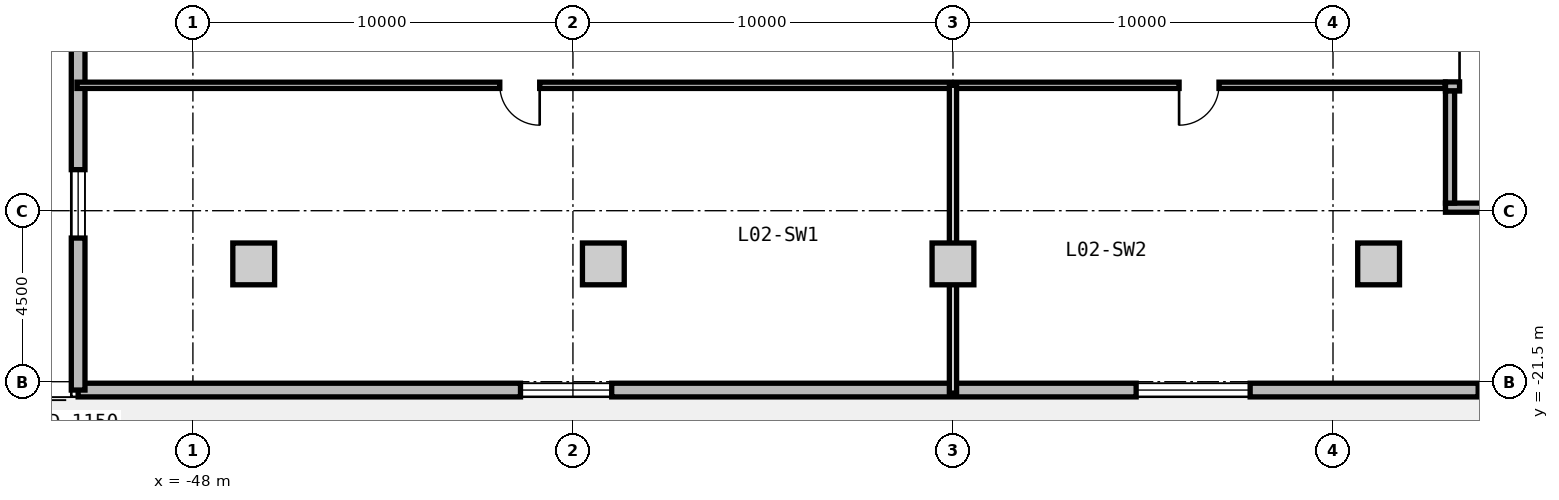
"""IFC4 building model, lengths in metres.
Left out: names, types, materials, properties, quantities, classifications, styles, units other than length and angle.
Written with IfcOpenShell. Run it as: python <this file> out.ifc"""

import sys

from ifc_helpers import new_model, si_unit, direction, frame, frame_2d, origin, origin_2d, place, context, subcontext, project, spatial, rectangle, extrude, source, transform, mapped, element, fill, save


model = new_model("IFC4")
c1 = context("Model", 3, precision=1e-05, world=origin(), true_north=direction((0.0, 1.0)))
c2 = subcontext(c1, "Body", "Model", "MODEL_VIEW")
j1 = project(units=[si_unit("LENGTHUNIT", "METRE"), si_unit("PLANEANGLEUNIT", "RADIAN")], contexts=[c1])
p1 = place(None, origin())
s1 = spatial("IfcSite", under=j1, at=p1, CompositionType="ELEMENT")
p2 = place(p1, origin())
s2 = spatial("IfcBuilding", under=s1, at=p2, CompositionType="ELEMENT")
p3 = place(p2, frame((0.0, 0.0, 8.4)))
s3 = spatial("IfcBuildingStorey", under=s2, at=p3, CompositionType="ELEMENT", Elevation=8.4)
m1 = source(origin(), c2, "Body", "SweptSolid", [
    extrude(rectangle(XDim=1.1, YDim=1.1, at=origin_2d()), origin(), (0.0, 0.0, 1.0), 4.2),
])
for number, where, z_axis, x_axis in (
    (1, (-46.4, -18.4, 0.0), (0.0, 0.0, 1.0), (1.0, 0.0, 0.0)),
    (2, (-37.2, -18.4, 0.0), (0.0, 0.0, 1.0), (1.0, 0.0, 0.0)),
    (3, (-28.0, -18.4, 0.0), (0.0, 0.0, 1.0), (1.0, 0.0, 0.0)),
    (4, (-16.8, -18.4, 0.0), (0.0, 0.0, 1.0), (1.0, 0.0, 0.0)),
):
    element("IfcColumn", number, at=place(p3, frame(where, z_axis=z_axis, x_axis=x_axis)), inside=s3, PredefinedType="COLUMN", context=c2, shape_type="MappedRepresentation", body=[
        mapped(m1, transform((0.0, 0.0, 0.0), x_axis=(1.0, 0.0, 0.0), y_axis=(0.0, 1.0, 0.0), z_axis=(0.0, 0.0, 1.0), scale=1.0)),
    ])
m2 = source(origin(), c2, "Body", "SweptSolid", [
    extrude(rectangle(XDim=102.04, YDim=0.36, at=frame_2d((51.02, 0.0))), origin(), (0.0, 0.0, 1.0), 3.88),
])
p4 = place(p3, frame((51.02, -21.72, 0.0), z_axis=(0.0, 0.0, 1.0), x_axis=(-1.0, 0.0, 0.0)))
e5 = element("IfcWall", 5, at=p4, inside=s3, PredefinedType="SOLIDWALL", context=c2, shape_type="MappedRepresentation", body=[
    mapped(m2, transform((0.0, 0.0, 0.0), x_axis=(1.0, 0.0, 0.0), y_axis=(0.0, 1.0, 0.0), z_axis=(0.0, 0.0, 1.0), scale=1.0)),
])
p5 = place(p4, frame((53.37, 0.0, 0.0)))
e6 = element("IfcOpeningElement", 6, at=p5, cuts=e5, PredefinedType="OPENING", context=c2, shape_type="SweptSolid", body=[
    extrude(rectangle(XDim=1.15, YDim=2.25, at=frame_2d((0.575, 1.125))), frame((0.0, 0.19, 0.0), z_axis=(0.0, -1.0, 0.0), x_axis=(1.0, 0.0, 0.0)), (0.0, 0.0, 1.0), 0.38),
])
p6 = place(p4, frame((4.0, 0.0, 0.9)))
e7 = element("IfcOpeningElement", 7, at=p6, cuts=e5, PredefinedType="OPENING", context=c2, shape_type="SweptSolid", body=[
    extrude(rectangle(XDim=1.8, YDim=2.0, at=frame_2d((0.9, 1.0))), frame((0.0, 0.19, 0.0), z_axis=(0.0, -1.0, 0.0), x_axis=(1.0, 0.0, 0.0)), (0.0, 0.0, 1.0), 0.38),
])
p7 = place(p4, frame((12.4, 0.0, 0.85)))
e8 = element("IfcOpeningElement", 8, at=p7, cuts=e5, PredefinedType="OPENING", context=c2, shape_type="SweptSolid", body=[
    extrude(rectangle(XDim=2.4, YDim=2.2, at=frame_2d((1.2, 1.1))), frame((0.0, 0.19, 0.0), z_axis=(0.0, -1.0, 0.0), x_axis=(1.0, 0.0, 0.0)), (0.0, 0.0, 1.0), 0.38),
])
p8 = place(p4, frame((29.2, 0.0, 0.9)))
e9 = element("IfcOpeningElement", 9, at=p8, cuts=e5, PredefinedType="OPENING", context=c2, shape_type="SweptSolid", body=[
    extrude(rectangle(XDim=1.8, YDim=2.0, at=frame_2d((0.9, 1.0))), frame((0.0, 0.19, 0.0), z_axis=(0.0, -1.0, 0.0), x_axis=(1.0, 0.0, 0.0)), (0.0, 0.0, 1.0), 0.38),
])
p9 = place(p4, frame((37.6, 0.0, 0.85)))
e10 = element("IfcOpeningElement", 10, at=p9, cuts=e5, PredefinedType="OPENING", context=c2, shape_type="SweptSolid", body=[
    extrude(rectangle(XDim=2.4, YDim=2.2, at=frame_2d((1.2, 1.1))), frame((0.0, 0.19, 0.0), z_axis=(0.0, -1.0, 0.0), x_axis=(1.0, 0.0, 0.0)), (0.0, 0.0, 1.0), 0.38),
])
p10 = place(p4, frame((62.8, 0.0, 0.85)))
e11 = element("IfcOpeningElement", 11, at=p10, cuts=e5, PredefinedType="OPENING", context=c2, shape_type="SweptSolid", body=[
    extrude(rectangle(XDim=2.4, YDim=2.2, at=frame_2d((1.2, 1.1))), frame((0.0, 0.19, 0.0), z_axis=(0.0, -1.0, 0.0), x_axis=(1.0, 0.0, 0.0)), (0.0, 0.0, 1.0), 0.38),
])
p11 = place(p4, frame((71.2, 0.0, 0.85)))
e12 = element("IfcOpeningElement", 12, at=p11, cuts=e5, PredefinedType="OPENING", context=c2, shape_type="SweptSolid", body=[
    extrude(rectangle(XDim=3.0, YDim=2.1, at=frame_2d((1.5, 1.05))), frame((0.0, 0.19, 0.0), z_axis=(0.0, -1.0, 0.0), x_axis=(1.0, 0.0, 0.0)), (0.0, 0.0, 1.0), 0.38),
])
p12 = place(p4, frame((88.0, 0.0, 0.85)))
e13 = element("IfcOpeningElement", 13, at=p12, cuts=e5, PredefinedType="OPENING", context=c2, shape_type="SweptSolid", body=[
    extrude(rectangle(XDim=2.4, YDim=2.2, at=frame_2d((1.2, 1.1))), frame((0.0, 0.19, 0.0), z_axis=(0.0, -1.0, 0.0), x_axis=(1.0, 0.0, 0.0)), (0.0, 0.0, 1.0), 0.38),
])
m3 = source(origin(), c2, "Body", "SweptSolid", [
    extrude(rectangle(XDim=43.44, YDim=0.36, at=frame_2d((21.72, 0.0))), origin(), (0.0, 0.0, 1.0), 3.88),
])
p13 = place(p3, frame((-51.02, -21.72, 0.0), z_axis=(0.0, 0.0, 1.0), x_axis=(0.0, 1.0, 0.0)))
e14 = element("IfcWall", 14, at=p13, inside=s3, PredefinedType="SOLIDWALL", context=c2, shape_type="MappedRepresentation", body=[
    mapped(m3, transform((0.0, 0.0, 0.0), x_axis=(1.0, 0.0, 0.0), y_axis=(0.0, 1.0, 0.0), z_axis=(0.0, 0.0, 1.0), scale=1.0)),
])
p14 = place(p13, frame((4.0, 0.0, 0.9)))
e15 = element("IfcOpeningElement", 15, at=p14, cuts=e14, PredefinedType="OPENING", context=c2, shape_type="SweptSolid", body=[
    extrude(rectangle(XDim=1.8, YDim=2.0, at=frame_2d((0.9, 1.0))), frame((0.0, 0.19, 0.0), z_axis=(0.0, -1.0, 0.0), x_axis=(1.0, 0.0, 0.0)), (0.0, 0.0, 1.0), 0.38),
])
p15 = place(p13, frame((12.4, 0.0, 0.85)))
e16 = element("IfcOpeningElement", 16, at=p15, cuts=e14, PredefinedType="OPENING", context=c2, shape_type="SweptSolid", body=[
    extrude(rectangle(XDim=2.4, YDim=2.2, at=frame_2d((1.2, 1.1))), frame((0.0, 0.19, 0.0), z_axis=(0.0, -1.0, 0.0), x_axis=(1.0, 0.0, 0.0)), (0.0, 0.0, 1.0), 0.38),
])
m4 = source(origin(), c2, "Body", "SweptSolid", [
    extrude(rectangle(XDim=7.88, YDim=0.24, at=frame_2d((3.94, 0.0))), origin(), (0.0, 0.0, 1.0), 3.88),
])
p16 = place(p3, frame((-15.04, -13.73, 0.0), z_axis=(0.0, 0.0, 1.0), x_axis=(1.0, 0.0, 0.0)))
e17 = element("IfcWall", 17, at=p16, inside=s3, PredefinedType="PARTITIONING", context=c2, shape_type="MappedRepresentation", body=[
    mapped(m4, transform((0.0, 0.0, 0.0), x_axis=(1.0, 0.0, 0.0), y_axis=(0.0, 1.0, 0.0), z_axis=(0.0, 0.0, 1.0), scale=1.0)),
])
p17 = place(p16, frame((0.37, 0.0, 0.0)))
e18 = element("IfcOpeningElement", 18, at=p17, cuts=e17, PredefinedType="OPENING", context=c2, shape_type="SweptSolid", body=[
    extrude(rectangle(XDim=1.1, YDim=2.15, at=frame_2d((0.55, 1.075))), frame((0.0, 0.13, 0.0), z_axis=(0.0, -1.0, 0.0), x_axis=(1.0, 0.0, 0.0)), (0.0, 0.0, 1.0), 0.26),
])
p18 = place(p3, frame((-15.04, -16.92, 0.0), z_axis=(0.0, 0.0, 1.0), x_axis=(1.0, 0.0, 0.0)))
e19 = element("IfcWall", 19, at=p18, inside=s3, PredefinedType="PARTITIONING", context=c2, shape_type="MappedRepresentation", body=[
    mapped(m4, transform((0.0, 0.0, 0.0), x_axis=(1.0, 0.0, 0.0), y_axis=(0.0, 1.0, 0.0), z_axis=(0.0, 0.0, 1.0), scale=1.0)),
])
m5 = source(origin(), c2, "Body", "SweptSolid", [
    extrude(rectangle(XDim=2.95, YDim=0.24, at=frame_2d((1.475, 0.0))), origin(), (0.0, 0.0, 1.0), 3.88),
])
p19 = place(p3, frame((-14.92, -16.8, 0.0), z_axis=(0.0, 0.0, 1.0), x_axis=(0.0, 1.0, 0.0)))
e20 = element("IfcWall", 20, at=p19, inside=s3, PredefinedType="PARTITIONING", context=c2, shape_type="MappedRepresentation", body=[
    mapped(m5, transform((0.0, 0.0, 0.0), x_axis=(1.0, 0.0, 0.0), y_axis=(0.0, 1.0, 0.0), z_axis=(0.0, 0.0, 1.0), scale=1.0)),
])
m6 = source(origin(), c2, "Body", "SweptSolid", [
    extrude(rectangle(XDim=36.0, YDim=0.165, at=frame_2d((18.0, 0.0))), origin(), (0.0, 0.0, 1.0), 3.865),
])
p20 = place(p3, frame((-51.05, -13.7, 0.0), z_axis=(0.0, 0.0, 1.0), x_axis=(1.0, 0.0, 0.0)))
e21 = element("IfcWall", 21, at=p20, inside=s3, PredefinedType="PARTITIONING", context=c2, shape_type="MappedRepresentation", body=[
    mapped(m6, transform((0.0, 0.0, 0.0), x_axis=(1.0, 0.0, 0.0), y_axis=(0.0, 1.0, 0.0), z_axis=(0.0, 0.0, 1.0), scale=1.0)),
])
p21 = place(p20, frame((11.125, 0.0, 0.0)))
e22 = element("IfcOpeningElement", 22, at=p21, cuts=e21, PredefinedType="OPENING", context=c2, shape_type="SweptSolid", body=[
    extrude(rectangle(XDim=1.05, YDim=2.15, at=frame_2d((0.525, 1.075))), frame((0.0, 0.093, 0.0), z_axis=(0.0, -1.0, 0.0), x_axis=(1.0, 0.0, 0.0)), (0.0, 0.0, 1.0), 0.185),
])
p22 = place(p20, frame((29.0, 0.0, 0.0)))
e23 = element("IfcOpeningElement", 23, at=p22, cuts=e21, PredefinedType="OPENING", context=c2, shape_type="SweptSolid", body=[
    extrude(rectangle(XDim=1.05, YDim=2.15, at=frame_2d((0.525, 1.075))), frame((0.0, 0.093, 0.0), z_axis=(0.0, -1.0, 0.0), x_axis=(1.0, 0.0, 0.0)), (0.0, 0.0, 1.0), 0.185),
])
m7 = source(origin(), c2, "Body", "SweptSolid", [
    extrude(rectangle(XDim=8.1, YDim=0.19, at=frame_2d((4.05, 0.0))), origin(), (0.0, 0.0, 1.0), 3.865),
])
p23 = place(p3, frame((-28.0, -21.8, 0.0), z_axis=(0.0, 0.0, 1.0), x_axis=(0.0, 1.0, 0.0)))
e24 = element("IfcWall", 24, at=p23, inside=s3, PredefinedType="PARTITIONING", context=c2, shape_type="MappedRepresentation", body=[
    mapped(m7, transform((0.0, 0.0, 0.0), x_axis=(1.0, 0.0, 0.0), y_axis=(0.0, 1.0, 0.0), z_axis=(0.0, 0.0, 1.0), scale=1.0)),
])
m8 = source(origin(), c2, "Body", "SweptSolid", [
    extrude(rectangle(XDim=2.4, YDim=2.2, at=frame_2d((1.2, 1.1))), frame((0.0, 0.03, 0.0), z_axis=(0.0, -1.0, 0.0), x_axis=(1.0, 0.0, 0.0)), (0.0, 0.0, 1.0), 0.06),
])
p24 = place(p10, origin())
e25 = element("IfcWindow", 25, at=p24, inside=s3, PartitioningType="SINGLE_PANEL", PredefinedType="WINDOW", context=c2, shape_type="MappedRepresentation", body=[
    mapped(m8, transform((0.0, 0.0, 0.0), x_axis=(1.0, 0.0, 0.0), y_axis=(0.0, 1.0, 0.0), z_axis=(0.0, 0.0, 1.0), scale=1.0)),
])
fill(e11, e25)
m9 = source(origin(), c2, "Body", "SweptSolid", [
    extrude(rectangle(XDim=3.0, YDim=2.1, at=frame_2d((1.5, 1.05))), frame((0.0, 0.03, 0.0), z_axis=(0.0, -1.0, 0.0), x_axis=(1.0, 0.0, 0.0)), (0.0, 0.0, 1.0), 0.06),
])
p25 = place(p11, origin())
e26 = element("IfcWindow", 26, at=p25, inside=s3, PartitioningType="SINGLE_PANEL", PredefinedType="WINDOW", context=c2, shape_type="MappedRepresentation", body=[
    mapped(m9, transform((0.0, 0.0, 0.0), x_axis=(1.0, 0.0, 0.0), y_axis=(0.0, 1.0, 0.0), z_axis=(0.0, 0.0, 1.0), scale=1.0)),
])
fill(e12, e26)
p26 = place(p12, origin())
e27 = element("IfcWindow", 27, at=p26, inside=s3, PartitioningType="SINGLE_PANEL", PredefinedType="WINDOW", context=c2, shape_type="MappedRepresentation", body=[
    mapped(m8, transform((0.0, 0.0, 0.0), x_axis=(1.0, 0.0, 0.0), y_axis=(0.0, 1.0, 0.0), z_axis=(0.0, 0.0, 1.0), scale=1.0)),
])
fill(e13, e27)
m10 = source(origin(), c2, "Body", "SweptSolid", [
    extrude(rectangle(XDim=1.8, YDim=2.0, at=frame_2d((0.9, 1.0))), frame((0.0, 0.03, 0.0), z_axis=(0.0, -1.0, 0.0), x_axis=(1.0, 0.0, 0.0)), (0.0, 0.0, 1.0), 0.06),
])
p27 = place(p14, origin())
e28 = element("IfcWindow", 28, at=p27, inside=s3, PartitioningType="SINGLE_PANEL", PredefinedType="WINDOW", context=c2, shape_type="MappedRepresentation", body=[
    mapped(m10, transform((0.0, 0.0, 0.0), x_axis=(1.0, 0.0, 0.0), y_axis=(0.0, 1.0, 0.0), z_axis=(0.0, 0.0, 1.0), scale=1.0)),
])
fill(e15, e28)
m11 = source(origin(), c2, "Body", "SweptSolid", [
    extrude(rectangle(XDim=1.1, YDim=2.15, at=frame_2d((0.55, 1.075))), frame((0.0, 0.025, 0.0), z_axis=(0.0, -1.0, 0.0), x_axis=(1.0, 0.0, 0.0)), (0.0, 0.0, 1.0), 0.05),
])
p28 = place(p17, origin())
e29 = element("IfcDoor", 29, at=p28, inside=s3, OperationType="SINGLE_SWING_LEFT", PredefinedType="DOOR", context=c2, shape_type="MappedRepresentation", body=[
    mapped(m11, transform((0.0, 0.0, 0.0), x_axis=(1.0, 0.0, 0.0), y_axis=(0.0, 1.0, 0.0), z_axis=(0.0, 0.0, 1.0), scale=1.0)),
])
fill(e18, e29)
m12 = source(origin(), c2, "Body", "SweptSolid", [
    extrude(rectangle(XDim=1.05, YDim=2.15, at=frame_2d((0.525, 1.075))), frame((0.0, 0.025, 0.0), z_axis=(0.0, -1.0, 0.0), x_axis=(1.0, 0.0, 0.0)), (0.0, 0.0, 1.0), 0.05),
])
p29 = place(p21, frame((1.05, 0.0, 0.0), z_axis=(0.0, 0.0, 1.0), x_axis=(-1.0, 0.0, 0.0)))
e30 = element("IfcDoor", 30, at=p29, inside=s3, OperationType="SINGLE_SWING_LEFT", PredefinedType="DOOR", context=c2, shape_type="MappedRepresentation", body=[
    mapped(m12, transform((0.0, 0.0, 0.0), x_axis=(1.0, 0.0, 0.0), y_axis=(0.0, 1.0, 0.0), z_axis=(0.0, 0.0, 1.0), scale=1.0)),
])
fill(e22, e30)
p30 = place(p22, frame((1.05, 0.0, 0.0), z_axis=(0.0, 0.0, 1.0), x_axis=(-1.0, 0.0, 0.0)))
e31 = element("IfcDoor", 31, at=p30, inside=s3, OperationType="SINGLE_SWING_RIGHT", PredefinedType="DOOR", context=c2, shape_type="MappedRepresentation", body=[
    mapped(m12, transform((0.0, 0.0, 0.0), x_axis=(1.0, 0.0, 0.0), y_axis=(0.0, 1.0, 0.0), z_axis=(0.0, 0.0, 1.0), scale=1.0)),
])
fill(e23, e31)
save(model, sys.argv[1])
